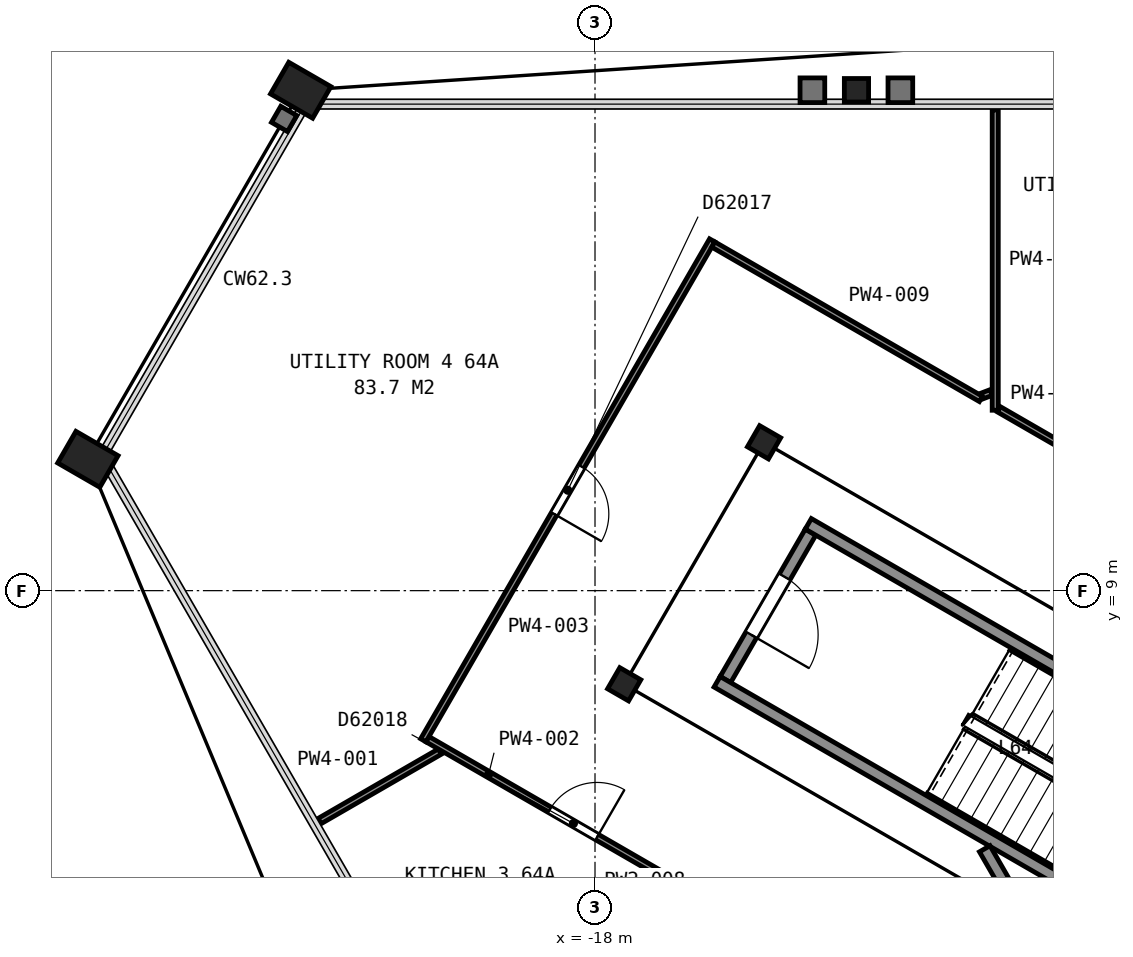
"""IFC4 building model, lengths in metres.
Left out: names, types, materials, properties, quantities, classifications, styles, units other than length and angle.
Written with IfcOpenShell. Run it as: python <this file> out.ifc"""

import sys

from ifc_helpers import new_model, si_unit, direction, frame, frame_2d, origin, origin_2d, place, context, subcontext, project, spatial, rectangle, hollow_rectangle, i_section, extrude, element, fill, save


model = new_model("IFC4")
c1 = context("Model", 3, precision=1e-05, world=origin(), true_north=direction((0.0, 1.0)))
c2 = subcontext(c1, "Body", "Model", "MODEL_VIEW")
j1 = project(units=[si_unit("LENGTHUNIT", "METRE"), si_unit("PLANEANGLEUNIT", "RADIAN")], contexts=[c1])
p1 = place(None, origin())
s1 = spatial("IfcSite", under=j1, at=p1, CompositionType="ELEMENT")
p2 = place(p1, origin())
s2 = spatial("IfcBuilding", under=s1, at=p2, CompositionType="ELEMENT")
p3 = place(p2, frame((0.0, 0.0, 254.5)))
s3 = spatial("IfcBuildingStorey", under=s2, at=p3, CompositionType="ELEMENT", Elevation=254.5)
p4 = place(p3, frame((-13.7, 17.23, 0.0), z_axis=(0.0, 0.0, 1.0), x_axis=(1.0, 0.0, 0.0)))
e1 = element("IfcColumn", 1, at=p4, inside=s3, PredefinedType="COLUMN", context=c2, shape_type="SweptSolid", body=[
    extrude(i_section(OverallWidth=0.399, OverallDepth=0.386, WebThickness=0.021, FlangeThickness=0.033, FilletRadius=0.015, at=origin_2d()), origin(), (0.0, 0.0, 1.0), 3.01),
])
for number, where, z_axis, x_axis in (
    (2, (-22.84, 17.23, 0.0), (0.0, 0.0, 1.0), (0.5, 0.866, 0.0)),
    (3, (-26.34, 11.16, 0.0), (0.0, 0.0, 1.0), (0.5, 0.866, 0.0)),
):
    element("IfcColumn", number, at=place(p3, frame(where, z_axis=z_axis, x_axis=x_axis)), inside=s3, PredefinedType="COLUMN", context=c2, shape_type="SweptSolid", body=[
        extrude(hollow_rectangle(XDim=0.6, YDim=0.8, WallThickness=0.05, at=origin_2d()), origin(), (0.0, 0.0, 1.0), 3.7),
    ])
for number, where, z_axis, x_axis in (
    (4, (-15.22, 11.44, 0.0), (0.0, 0.0, 1.0), (0.5, 0.866, 0.0)),
    (5, (-17.52, 7.46, 0.0), (0.0, 0.0, 1.0), (0.5, 0.866, 0.0)),
):
    element("IfcColumn", number, at=place(p3, frame(where, z_axis=z_axis, x_axis=x_axis)), inside=s3, PredefinedType="COLUMN", context=c2, shape_type="SweptSolid", body=[
        extrude(i_section(OverallWidth=0.401, OverallDepth=0.399, WebThickness=0.025, FlangeThickness=0.04, FilletRadius=0.015, at=origin_2d()), origin(), (0.0, 0.0, 1.0), 3.65),
    ])
p5 = place(p3, frame((-14.455, 9.962, 0.0), z_axis=(0.0, 0.0, 1.0), x_axis=(-0.500049511043, -0.865996816683, 0.0)))
e6 = element("IfcWall", 6, at=p5, inside=s3, PredefinedType="PARTITIONING", context=c2, shape_type="SweptSolid", body=[
    extrude(rectangle(XDim=2.8, YDim=0.2, at=frame_2d((1.4, 0.0))), origin(), (0.0, 0.0, 1.0), 3.45),
])
p6 = place(p5, frame((0.85, 0.0, 0.0)))
e7 = element("IfcOpeningElement", 7, at=p6, cuts=e6, PredefinedType="OPENING", context=c2, shape_type="SweptSolid", body=[
    extrude(rectangle(XDim=1.1, YDim=2.1, at=frame_2d((0.55, 1.05))), frame((0.0, 0.11, 0.0), z_axis=(0.0, -1.0, 0.0), x_axis=(1.0, 0.0, 0.0)), (0.0, 0.0, 1.0), 0.22),
])
for number, where, z_axis, x_axis in (
    (8, (-7.678, 2.701, 0.0), (0.0, 0.0, 1.0), (-0.866, 0.5, 0.0)),
    (9, (-6.178, 5.299, 0.0), (0.0, 0.0, 1.0), (-0.866, 0.5, 0.0)),
):
    element("IfcWall", number, at=place(p3, frame(where, z_axis=z_axis, x_axis=x_axis)), inside=s3, PredefinedType="PARTITIONING", context=c2, shape_type="SweptSolid", body=[
        extrude(rectangle(XDim=9.6, YDim=0.2, at=frame_2d((4.8, 0.0))), origin(), (0.0, 0.0, 1.0), 3.45),
    ])
p7 = place(p3, frame((-11.591, 4.755, 0.0), z_axis=(0.0, 0.0, 1.0), x_axis=(0.500043977787, -0.866000011708, 0.0)))
e10 = element("IfcWall", 10, at=p7, inside=s3, PredefinedType="PARTITIONING", context=c2, shape_type="SweptSolid", body=[
    extrude(rectangle(XDim=6.617, YDim=0.2, at=frame_2d((3.308, 0.0))), origin(), (0.0, 0.0, 1.0), 3.45),
])
p8 = place(p7, frame((3.695, 0.0, 0.0)))
e11 = element("IfcOpeningElement", 11, at=p8, cuts=e10, PredefinedType="OPENING", context=c2, shape_type="SweptSolid", body=[
    extrude(rectangle(XDim=1.8, YDim=2.1, at=frame_2d((0.9, 1.05))), frame((0.0, 0.11, 0.0), z_axis=(0.0, -1.0, 0.0), x_axis=(1.0, 0.0, 0.0)), (0.0, 0.0, 1.0), 0.22),
])
p9 = place(p3, frame((-22.53, 5.21, 0.0), z_axis=(0.0, 0.0, 1.0), x_axis=(0.865865073245, 0.500277597875, 0.0)))
e12 = element("IfcWall", 12, at=p9, inside=s3, PredefinedType="PARTITIONING", context=c2, shape_type="SweptSolid", body=[
    extrude(rectangle(XDim=2.284, YDim=0.1, at=frame_2d((1.142, 0.0))), origin(), (0.0, 0.0, 1.0), 2.362),
])
p10 = place(p3, frame((-16.253, 3.957, 0.0), z_axis=(0.0, 0.0, 1.0), x_axis=(-0.866006514596, 0.500032715607, 0.0)))
e13 = element("IfcWall", 13, at=p10, inside=s3, PredefinedType="PARTITIONING", context=c2, shape_type="SweptSolid", body=[
    extrude(rectangle(XDim=5.199, YDim=0.1, at=frame_2d((2.6, 0.0))), origin(), (0.0, 0.0, 1.0), 2.362),
])
p11 = place(p10, frame((1.978, 0.0, 0.0)))
e14 = element("IfcOpeningElement", 14, at=p11, cuts=e13, PredefinedType="OPENING", context=c2, shape_type="SweptSolid", body=[
    extrude(rectangle(XDim=0.9, YDim=2.1, at=frame_2d((0.45, 1.05))), frame((0.0, 0.06, 0.0), z_axis=(0.0, -1.0, 0.0), x_axis=(1.0, 0.0, 0.0)), (0.0, 0.0, 1.0), 0.12),
])
p12 = place(p3, frame((-20.824, 6.539, 0.0), z_axis=(0.0, 0.0, 1.0), x_axis=(0.500297300687, 0.865853689098, 0.0)))
e15 = element("IfcWall", 15, at=p12, inside=s3, PredefinedType="PARTITIONING", context=c2, shape_type="SweptSolid", body=[
    extrude(rectangle(XDim=9.496, YDim=0.1, at=frame_2d((4.748, 0.0))), origin(), (0.0, 0.0, 1.0), 2.362),
])
p13 = place(p12, frame((4.3, 0.0, 0.0)))
e16 = element("IfcOpeningElement", 16, at=p13, cuts=e15, PredefinedType="OPENING", context=c2, shape_type="SweptSolid", body=[
    extrude(rectangle(XDim=0.9, YDim=2.1, at=frame_2d((0.45, 1.05))), frame((0.0, 0.06, 0.0), z_axis=(0.0, -1.0, 0.0), x_axis=(1.0, 0.0, 0.0)), (0.0, 0.0, 1.0), 0.12),
])
p14 = place(p3, frame((-16.055, 14.693, 0.0), z_axis=(0.0, 0.0, 1.0), x_axis=(0.866094383736, -0.499880504182, 0.0)))
e17 = element("IfcWall", 17, at=p14, inside=s3, PredefinedType="PARTITIONING", context=c2, shape_type="SweptSolid", body=[
    extrude(rectangle(XDim=5.081, YDim=0.1, at=frame_2d((2.541, 0.0))), origin(), (0.0, 0.0, 1.0), 2.362),
])
p15 = place(p3, frame((-11.632, 12.203, 0.0), z_axis=(0.0, 0.0, 1.0), x_axis=(0.934710776834, 0.355409290354, 0.0)))
e18 = element("IfcWall", 18, at=p15, inside=s3, PredefinedType="PARTITIONING", context=c2, shape_type="SweptSolid", body=[
    extrude(rectangle(XDim=0.156, YDim=0.1, at=frame_2d((0.078, 0.0))), origin(), (0.0, 0.0, 1.0), 2.362),
])
p16 = place(p3, frame((-11.418, 11.967, 0.0), z_axis=(0.0, 0.0, 1.0), x_axis=(0.0, 1.0, 0.0)))
e19 = element("IfcWall", 19, at=p16, inside=s3, PredefinedType="PARTITIONING", context=c2, shape_type="SweptSolid", body=[
    extrude(rectangle(XDim=4.939, YDim=0.1, at=frame_2d((2.469, 0.0))), origin(), (0.0, 0.0, 1.0), 2.362),
])
p17 = place(p3, frame((-11.357, 11.982, 0.0), z_axis=(0.0, 0.0, 1.0), x_axis=(0.866039032844, -0.499976393034, 0.0)))
e20 = element("IfcWall", 20, at=p17, inside=s3, PredefinedType="PARTITIONING", context=c2, shape_type="SweptSolid", body=[
    extrude(rectangle(XDim=3.079, YDim=0.1, at=frame_2d((1.54, 0.0))), origin(), (0.0, 0.0, 1.0), 2.362),
])
p18 = place(p17, frame((1.08, 0.0, 0.0)))
e21 = element("IfcOpeningElement", 21, at=p18, cuts=e20, PredefinedType="OPENING", context=c2, shape_type="SweptSolid", body=[
    extrude(rectangle(XDim=0.9, YDim=2.1, at=frame_2d((0.45, 1.05))), frame((0.0, 0.06, 0.0), z_axis=(0.0, -1.0, 0.0), x_axis=(1.0, 0.0, 0.0)), (0.0, 0.0, 1.0), 0.12),
])
p19 = place(p6, origin())
e22 = element("IfcDoor", 22, at=p19, inside=s3, OperationType="SINGLE_SWING_RIGHT", PredefinedType="DOOR", context=c2, shape_type="SweptSolid", body=[
    extrude(rectangle(XDim=1.1, YDim=2.1, at=frame_2d((0.55, 1.05))), frame((0.0, 0.025, 0.0), z_axis=(0.0, -1.0, 0.0), x_axis=(1.0, 0.0, 0.0)), (0.0, 0.0, 1.0), 0.05),
])
fill(e7, e22)
p20 = place(p11, origin())
e23 = element("IfcDoor", 23, at=p20, inside=s3, OperationType="SINGLE_SWING_LEFT", PredefinedType="DOOR", context=c2, shape_type="SweptSolid", body=[
    extrude(rectangle(XDim=0.9, YDim=2.1, at=frame_2d((0.45, 1.05))), frame((0.0, 0.025, 0.0), z_axis=(0.0, -1.0, 0.0), x_axis=(1.0, 0.0, 0.0)), (0.0, 0.0, 1.0), 0.05),
])
fill(e14, e23)
p21 = place(p13, origin())
e24 = element("IfcDoor", 24, at=p21, inside=s3, OperationType="SINGLE_SWING_LEFT", PredefinedType="DOOR", context=c2, shape_type="SweptSolid", body=[
    extrude(rectangle(XDim=0.9, YDim=2.1, at=frame_2d((0.45, 1.05))), frame((0.0, 0.025, 0.0), z_axis=(0.0, -1.0, 0.0), x_axis=(1.0, 0.0, 0.0)), (0.0, 0.0, 1.0), 0.05),
])
fill(e16, e24)
save(model, sys.argv[1])
